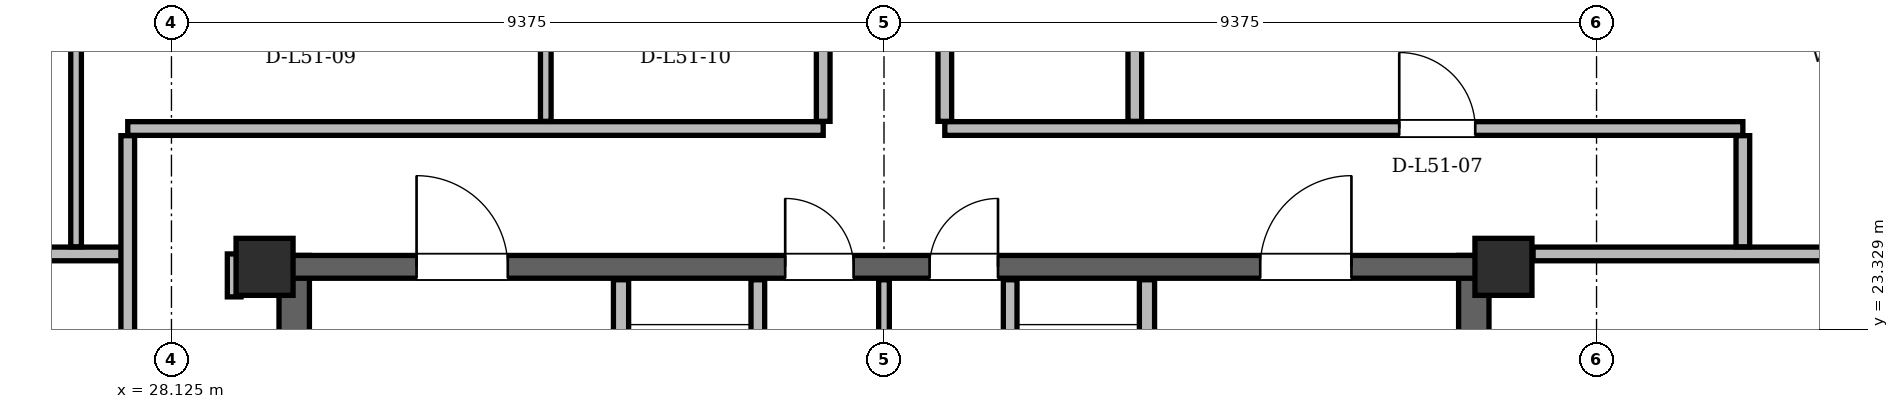
"""IFC4 building model, lengths in metres.
Left out: names, types, materials, properties, quantities, classifications, styles, units other than length and angle.
Written with IfcOpenShell. Run it as: python <this file> out.ifc"""

import sys

from ifc_helpers import new_model, si_unit, direction, frame, frame_2d, origin, origin_2d, place, context, subcontext, project, spatial, rectangle, hollow_rectangle, extrude, element, fill, save


model = new_model("IFC4")
c1 = context("Model", 3, precision=1e-05, world=origin(), true_north=direction((0.0, 1.0)))
c2 = subcontext(c1, "Body", "Model", "MODEL_VIEW")
j1 = project(units=[si_unit("LENGTHUNIT", "METRE"), si_unit("PLANEANGLEUNIT", "RADIAN")], contexts=[c1])
p1 = place(None, origin())
s1 = spatial("IfcSite", under=j1, at=p1, CompositionType="ELEMENT")
p2 = place(p1, origin())
s2 = spatial("IfcBuilding", under=s1, at=p2, CompositionType="ELEMENT")
p3 = place(p2, frame((0.0, 0.0, 193.8)))
s3 = spatial("IfcBuildingStorey", under=s2, at=p3, CompositionType="ELEMENT", Elevation=193.8)
for number, where, z_axis, x_axis in (
    (1, (45.65, 24.15, 0.0), (0.0, 0.0, 1.0), (1.0, 0.0, 0.0)),
    (2, (29.35, 24.15, 0.0), (0.0, 0.0, 1.0), (1.0, 0.0, 0.0)),
):
    element("IfcColumn", number, at=place(p3, frame(where, z_axis=z_axis, x_axis=x_axis)), inside=s3, PredefinedType="COLUMN", context=c2, shape_type="SweptSolid", body=[
        extrude(hollow_rectangle(XDim=0.75, YDim=0.75, WallThickness=0.06, at=origin_2d()), origin(), (0.0, 0.0, 1.0), 3.6),
    ])
for number, where, z_axis, x_axis in (
    (3, (29.74, 11.0, 0.0), (0.0, 0.0, 1.0), (0.0, 1.0, 0.0)),
    (4, (45.26, 11.0, 0.0), (0.0, 0.0, 1.0), (0.0, 1.0, 0.0)),
):
    element("IfcWall", number, at=place(p3, frame(where, z_axis=z_axis, x_axis=x_axis)), inside=s3, PredefinedType="SHEAR", context=c2, shape_type="SweptSolid", body=[
        extrude(rectangle(XDim=13.3, YDim=0.4, at=frame_2d((6.65, 0.0))), origin(), (0.0, 0.0, 1.0), 3.38),
    ])
p4 = place(p3, frame((29.65, 24.15, 0.0), z_axis=(0.0, 0.0, 1.0), x_axis=(1.0, 0.0, 0.0)))
e5 = element("IfcWall", 5, at=p4, inside=s3, PredefinedType="SHEAR", context=c2, shape_type="SweptSolid", body=[
    extrude(rectangle(XDim=15.7, YDim=0.3, at=frame_2d((7.85, 0.0))), origin(), (0.0, 0.0, 1.0), 3.38),
])
p5 = place(p4, frame((1.7, 0.0, 0.0)))
e6 = element("IfcOpeningElement", 6, at=p5, cuts=e5, PredefinedType="OPENING", context=c2, shape_type="SweptSolid", body=[
    extrude(rectangle(XDim=1.2, YDim=2.2, at=frame_2d((0.6, 1.1))), frame((0.0, 0.15, 0.0), z_axis=(0.0, -1.0, 0.0), x_axis=(1.0, 0.0, 0.0)), (0.0, 0.0, 1.0), 0.3),
])
p6 = place(p4, frame((12.8, 0.0, 0.0)))
e7 = element("IfcOpeningElement", 7, at=p6, cuts=e5, PredefinedType="OPENING", context=c2, shape_type="SweptSolid", body=[
    extrude(rectangle(XDim=1.2, YDim=2.2, at=frame_2d((0.6, 1.1))), frame((0.0, 0.15, 0.0), z_axis=(0.0, -1.0, 0.0), x_axis=(1.0, 0.0, 0.0)), (0.0, 0.0, 1.0), 0.3),
])
p7 = place(p4, frame((6.55, 0.0, 0.0)))
e8 = element("IfcOpeningElement", 8, at=p7, cuts=e5, PredefinedType="OPENING", context=c2, shape_type="SweptSolid", body=[
    extrude(rectangle(XDim=0.9, YDim=2.05, at=frame_2d((0.45, 1.025))), frame((0.0, 0.15, 0.0), z_axis=(0.0, -1.0, 0.0), x_axis=(1.0, 0.0, 0.0)), (0.0, 0.0, 1.0), 0.3),
])
p8 = place(p4, frame((8.45, 0.0, 0.0)))
e9 = element("IfcOpeningElement", 9, at=p8, cuts=e5, PredefinedType="OPENING", context=c2, shape_type="SweptSolid", body=[
    extrude(rectangle(XDim=0.9, YDim=2.05, at=frame_2d((0.45, 1.025))), frame((0.0, 0.15, 0.0), z_axis=(0.0, -1.0, 0.0), x_axis=(1.0, 0.0, 0.0)), (0.0, 0.0, 1.0), 0.3),
])
p9 = place(p3, frame((59.426, 11.839, 0.0), z_axis=(0.0, 0.0, 1.0), x_axis=(-0.499997159266, 0.866027043877, 0.0)))
e10 = element("IfcWall", 10, at=p9, inside=s3, PredefinedType="SOLIDWALL", context=c2, shape_type="SweptSolid", body=[
    extrude(rectangle(XDim=36.235, YDim=0.29, at=frame_2d((18.117, 0.0))), origin(), (0.0, 0.0, 1.0), 2.677),
])
p10 = place(p9, frame((6.579, 0.0, 0.0)))
e11 = element("IfcOpeningElement", 11, at=p10, cuts=e10, PredefinedType="OPENING", context=c2, shape_type="SweptSolid", body=[
    extrude(rectangle(XDim=1.5, YDim=2.2, at=frame_2d((0.75, 1.1))), frame((0.0, 0.145, 0.0), z_axis=(0.0, -1.0, 0.0), x_axis=(1.0, 0.0, 0.0)), (0.0, 0.0, 1.0), 0.29),
])
p11 = place(p9, frame((26.7, 0.0, 0.0)))
e12 = element("IfcOpeningElement", 12, at=p11, cuts=e10, PredefinedType="OPENING", context=c2, shape_type="SweptSolid", body=[
    extrude(rectangle(XDim=1.5, YDim=2.2, at=frame_2d((0.75, 1.1))), frame((0.0, 0.145, 0.0), z_axis=(0.0, -1.0, 0.0), x_axis=(1.0, 0.0, 0.0)), (0.0, 0.0, 1.0), 0.29),
])
p12 = place(p9, frame((34.18, 0.0, 0.85)))
e13 = element("IfcOpeningElement", 13, at=p12, cuts=e10, PredefinedType="OPENING", context=c2, shape_type="SweptSolid", body=[
    extrude(rectangle(XDim=1.2, YDim=1.48, at=frame_2d((0.6, 0.74))), frame((0.0, 0.145, 0.0), z_axis=(0.0, -1.0, 0.0), x_axis=(1.0, 0.0, 0.0)), (0.0, 0.0, 1.0), 0.29),
])
p13 = place(p9, frame((16.442, 0.0, 0.85)))
e14 = element("IfcOpeningElement", 14, at=p13, cuts=e10, PredefinedType="OPENING", context=c2, shape_type="SweptSolid", body=[
    extrude(rectangle(XDim=2.5, YDim=1.717, at=frame_2d((1.25, 0.858))), frame((0.0, 0.145, 0.0), z_axis=(0.0, -1.0, 0.0), x_axis=(1.0, 0.0, 0.0)), (0.0, 0.0, 1.0), 0.29),
])
p14 = place(p3, frame((33.691, 43.219, 0.0), z_axis=(0.0, 0.0, 1.0), x_axis=(-0.499997159266, -0.866027043877, 0.0)))
e15 = element("IfcWall", 15, at=p14, inside=s3, PredefinedType="SOLIDWALL", context=c2, shape_type="SweptSolid", body=[
    extrude(rectangle(XDim=36.235, YDim=0.29, at=frame_2d((18.117, 0.0))), origin(), (0.0, 0.0, 1.0), 2.677),
])
p15 = place(p14, frame((6.579, 0.0, 0.0)))
e16 = element("IfcOpeningElement", 16, at=p15, cuts=e15, PredefinedType="OPENING", context=c2, shape_type="SweptSolid", body=[
    extrude(rectangle(XDim=1.5, YDim=2.2, at=frame_2d((0.75, 1.1))), frame((0.0, 0.145, 0.0), z_axis=(0.0, -1.0, 0.0), x_axis=(1.0, 0.0, 0.0)), (0.0, 0.0, 1.0), 0.29),
])
p16 = place(p14, frame((26.7, 0.0, 0.0)))
e17 = element("IfcOpeningElement", 17, at=p16, cuts=e15, PredefinedType="OPENING", context=c2, shape_type="SweptSolid", body=[
    extrude(rectangle(XDim=1.5, YDim=2.2, at=frame_2d((0.75, 1.1))), frame((0.0, 0.145, 0.0), z_axis=(0.0, -1.0, 0.0), x_axis=(1.0, 0.0, 0.0)), (0.0, 0.0, 1.0), 0.29),
])
p17 = place(p14, frame((32.74, 0.0, 0.85)))
e18 = element("IfcOpeningElement", 18, at=p17, cuts=e15, PredefinedType="OPENING", context=c2, shape_type="SweptSolid", body=[
    extrude(rectangle(XDim=2.4, YDim=1.717, at=frame_2d((1.2, 0.858))), frame((0.0, 0.145, 0.0), z_axis=(0.0, -1.0, 0.0), x_axis=(1.0, 0.0, 0.0)), (0.0, 0.0, 1.0), 0.29),
])
p18 = place(p14, frame((21.971, 0.0, 0.85)))
e19 = element("IfcOpeningElement", 19, at=p18, cuts=e15, PredefinedType="OPENING", context=c2, shape_type="SweptSolid", body=[
    extrude(rectangle(XDim=2.0, YDim=1.717, at=frame_2d((1.0, 0.858))), frame((0.0, 0.145, 0.0), z_axis=(0.0, -1.0, 0.0), x_axis=(1.0, 0.0, 0.0)), (0.0, 0.0, 1.0), 0.29),
])
p19 = place(p14, frame((2.383, 0.0, 0.85)))
e20 = element("IfcOpeningElement", 20, at=p19, cuts=e15, PredefinedType="OPENING", context=c2, shape_type="SweptSolid", body=[
    extrude(rectangle(XDim=1.6, YDim=1.7, at=frame_2d((0.8, 0.85))), frame((0.0, 0.145, 0.0), z_axis=(0.0, -1.0, 0.0), x_axis=(1.0, 0.0, 0.0)), (0.0, 0.0, 1.0), 0.29),
])
p20 = place(p14, frame((13.348, 0.0, 0.85)))
e21 = element("IfcOpeningElement", 21, at=p20, cuts=e15, PredefinedType="OPENING", context=c2, shape_type="SweptSolid", body=[
    extrude(rectangle(XDim=3.0, YDim=1.717, at=frame_2d((1.5, 0.858))), frame((0.0, 0.145, 0.0), z_axis=(0.0, -1.0, 0.0), x_axis=(1.0, 0.0, 0.0)), (0.0, 0.0, 1.0), 0.29),
])
p21 = place(p3, frame((34.04, 19.48, 0.0), z_axis=(0.0, 0.0, 1.0), x_axis=(0.0, 1.0, 0.0)))
e22 = element("IfcWall", 22, at=p21, inside=s3, PredefinedType="PARTITIONING", context=c2, shape_type="SweptSolid", body=[
    extrude(rectangle(XDim=4.5, YDim=0.2, at=frame_2d((2.25, 0.0))), origin(), (0.0, 0.0, 1.0), 3.38),
])
p22 = place(p21, frame((2.12, 0.0, 0.0)))
e23 = element("IfcOpeningElement", 23, at=p22, cuts=e22, PredefinedType="OPENING", context=c2, shape_type="SweptSolid", body=[
    extrude(rectangle(XDim=1.1, YDim=2.2, at=frame_2d((0.55, 1.1))), frame((0.0, 0.1, 0.0), z_axis=(0.0, -1.0, 0.0), x_axis=(1.0, 0.0, 0.0)), (0.0, 0.0, 1.0), 0.2),
])
p23 = place(p3, frame((35.84, 20.96, 0.0), z_axis=(0.0, 0.0, 1.0), x_axis=(0.0, 1.0, 0.0)))
e24 = element("IfcWall", 24, at=p23, inside=s3, PredefinedType="PARTITIONING", context=c2, shape_type="SweptSolid", body=[
    extrude(rectangle(XDim=3.02, YDim=0.18, at=frame_2d((1.51, 0.0))), origin(), (0.0, 0.0, 1.0), 3.38),
])
p24 = place(p3, frame((40.96, 19.48, 0.0), z_axis=(0.0, 0.0, 1.0), x_axis=(0.0, 1.0, 0.0)))
e25 = element("IfcWall", 25, at=p24, inside=s3, PredefinedType="PARTITIONING", context=c2, shape_type="SweptSolid", body=[
    extrude(rectangle(XDim=4.5, YDim=0.2, at=frame_2d((2.25, 0.0))), origin(), (0.0, 0.0, 1.0), 3.38),
])
p25 = place(p24, frame((2.12, 0.0, 0.0)))
e26 = element("IfcOpeningElement", 26, at=p25, cuts=e25, PredefinedType="OPENING", context=c2, shape_type="SweptSolid", body=[
    extrude(rectangle(XDim=1.1, YDim=2.2, at=frame_2d((0.55, 1.1))), frame((0.0, 0.1, 0.0), z_axis=(0.0, -1.0, 0.0), x_axis=(1.0, 0.0, 0.0)), (0.0, 0.0, 1.0), 0.2),
])
p26 = place(p3, frame((39.16, 20.96, 0.0), z_axis=(0.0, 0.0, 1.0), x_axis=(0.0, 1.0, 0.0)))
e27 = element("IfcWall", 27, at=p26, inside=s3, PredefinedType="PARTITIONING", context=c2, shape_type="SweptSolid", body=[
    extrude(rectangle(XDim=3.02, YDim=0.18, at=frame_2d((1.51, 0.0))), origin(), (0.0, 0.0, 1.0), 3.38),
])
p27 = place(p3, frame((37.5, 21.06, 0.0), z_axis=(0.0, 0.0, 1.0), x_axis=(0.0, 1.0, 0.0)))
e28 = element("IfcWall", 28, at=p27, inside=s3, PredefinedType="PARTITIONING", context=c2, shape_type="SweptSolid", body=[
    extrude(rectangle(XDim=2.92, YDim=0.14, at=frame_2d((1.46, 0.0))), origin(), (0.0, 0.0, 1.0), 3.38),
])
p28 = place(p3, frame((22.952, 24.32, 0.0), z_axis=(0.0, 0.0, 1.0), x_axis=(1.0, 0.0, 0.0)))
e29 = element("IfcWall", 29, at=p28, inside=s3, PredefinedType="PARTITIONING", context=c2, shape_type="SweptSolid", body=[
    extrude(rectangle(XDim=4.658, YDim=0.18, at=frame_2d((2.329, 0.0))), origin(), (0.0, 0.0, 1.0), 3.38),
])
p29 = place(p3, frame((46.04, 24.32, 0.0), z_axis=(0.0, 0.0, 1.0), x_axis=(1.0, 0.0, 0.0)))
e30 = element("IfcWall", 30, at=p29, inside=s3, PredefinedType="PARTITIONING", context=c2, shape_type="SweptSolid", body=[
    extrude(rectangle(XDim=6.008, YDim=0.18, at=frame_2d((3.004, 0.0))), origin(), (0.0, 0.0, 1.0), 3.38),
])
p30 = place(p3, frame((27.55, 25.97, 0.0), z_axis=(0.0, 0.0, 1.0), x_axis=(1.0, 0.0, 0.0)))
e31 = element("IfcWall", 31, at=p30, inside=s3, PredefinedType="PARTITIONING", context=c2, shape_type="SweptSolid", body=[
    extrude(rectangle(XDim=9.15, YDim=0.18, at=frame_2d((4.575, 0.0))), origin(), (0.0, 0.0, 1.0), 2.913),
])
p31 = place(p3, frame((38.3, 25.97, 0.0), z_axis=(0.0, 0.0, 1.0), x_axis=(1.0, 0.0, 0.0)))
e32 = element("IfcWall", 32, at=p31, inside=s3, PredefinedType="PARTITIONING", context=c2, shape_type="SweptSolid", body=[
    extrude(rectangle(XDim=10.5, YDim=0.18, at=frame_2d((5.25, 0.0))), origin(), (0.0, 0.0, 1.0), 2.913),
])
p32 = place(p31, frame((5.979, 0.0, 0.0)))
e33 = element("IfcOpeningElement", 33, at=p32, cuts=e32, PredefinedType="OPENING", context=c2, shape_type="SweptSolid", body=[
    extrude(rectangle(XDim=1.0, YDim=2.18, at=frame_2d((0.5, 1.09))), frame((0.0, 0.09, 0.0), z_axis=(0.0, -1.0, 0.0), x_axis=(1.0, 0.0, 0.0)), (0.0, 0.0, 1.0), 0.18),
])
p33 = place(p3, frame((26.87, 24.414, 0.0), z_axis=(0.0, 0.0, 1.0), x_axis=(0.0, 1.0, 0.0)))
e34 = element("IfcWall", 34, at=p33, inside=s3, PredefinedType="PARTITIONING", context=c2, shape_type="SweptSolid", body=[
    extrude(rectangle(XDim=2.912, YDim=0.14, at=frame_2d((1.456, 0.0))), origin(), (0.0, 0.0, 1.0), 3.38),
])
p34 = place(p3, frame((27.55, 18.544, 0.0), z_axis=(0.0, 0.0, 1.0), x_axis=(0.0, 1.0, 0.0)))
e35 = element("IfcWall", 35, at=p34, inside=s3, PredefinedType="PARTITIONING", context=c2, shape_type="SweptSolid", body=[
    extrude(rectangle(XDim=7.332, YDim=0.18, at=frame_2d((3.666, 0.0))), origin(), (0.0, 0.0, 1.0), 3.38),
])
p35 = place(p3, frame((28.95, 23.755, 0.0), z_axis=(0.0, 0.0, 1.0), x_axis=(0.0, 1.0, 0.0)))
e36 = element("IfcWall", 36, at=p35, inside=s3, PredefinedType="PARTITIONING", context=c2, shape_type="SweptSolid", body=[
    extrude(rectangle(XDim=0.565, YDim=0.18, at=frame_2d((0.283, 0.0))), origin(), (0.0, 0.0, 1.0), 3.38),
])
p36 = place(p3, frame((33.05, 26.064, 0.0), z_axis=(0.0, 0.0, 1.0), x_axis=(0.0, 1.0, 0.0)))
e37 = element("IfcWall", 37, at=p36, inside=s3, PredefinedType="PARTITIONING", context=c2, shape_type="SweptSolid", body=[
    extrude(rectangle(XDim=1.262, YDim=0.14, at=frame_2d((0.631, 0.0))), origin(), (0.0, 0.0, 1.0), 3.38),
])
p37 = place(p3, frame((36.7, 26.064, 0.0), z_axis=(0.0, 0.0, 1.0), x_axis=(0.0, 1.0, 0.0)))
e38 = element("IfcWall", 38, at=p37, inside=s3, PredefinedType="PARTITIONING", context=c2, shape_type="SweptSolid", body=[
    extrude(rectangle(XDim=17.006, YDim=0.18, at=frame_2d((8.503, 0.0))), origin(), (0.0, 0.0, 1.0), 3.38),
])
p38 = place(p37, frame((3.21, 0.0, 0.0)))
e39 = element("IfcOpeningElement", 39, at=p38, cuts=e38, PredefinedType="OPENING", context=c2, shape_type="SweptSolid", body=[
    extrude(rectangle(XDim=1.0, YDim=2.18, at=frame_2d((0.5, 1.09))), frame((0.0, 0.09, 0.0), z_axis=(0.0, -1.0, 0.0), x_axis=(1.0, 0.0, 0.0)), (0.0, 0.0, 1.0), 0.18),
])
p39 = place(p3, frame((38.3, 26.064, 0.0), z_axis=(0.0, 0.0, 1.0), x_axis=(0.0, 1.0, 0.0)))
e40 = element("IfcWall", 40, at=p39, inside=s3, PredefinedType="PARTITIONING", context=c2, shape_type="SweptSolid", body=[
    extrude(rectangle(XDim=6.042, YDim=0.18, at=frame_2d((3.021, 0.0))), origin(), (0.0, 0.0, 1.0), 3.38),
])
p40 = place(p39, frame((4.892, 0.0, 0.0)))
e41 = element("IfcOpeningElement", 41, at=p40, cuts=e40, PredefinedType="OPENING", context=c2, shape_type="SweptSolid", body=[
    extrude(rectangle(XDim=1.0, YDim=2.18, at=frame_2d((0.5, 1.09))), frame((0.0, 0.09, 0.0), z_axis=(0.0, -1.0, 0.0), x_axis=(1.0, 0.0, 0.0)), (0.0, 0.0, 1.0), 0.18),
])
p41 = place(p3, frame((40.8, 26.064, 0.0), z_axis=(0.0, 0.0, 1.0), x_axis=(0.0, 1.0, 0.0)))
e42 = element("IfcWall", 42, at=p41, inside=s3, PredefinedType="PARTITIONING", context=c2, shape_type="SweptSolid", body=[
    extrude(rectangle(XDim=17.006, YDim=0.18, at=frame_2d((8.503, 0.0))), origin(), (0.0, 0.0, 1.0), 3.38),
])
p42 = place(p3, frame((48.8, 24.414, 0.0), z_axis=(0.0, 0.0, 1.0), x_axis=(0.0, 1.0, 0.0)))
e43 = element("IfcWall", 43, at=p42, inside=s3, PredefinedType="PARTITIONING", context=c2, shape_type="SweptSolid", body=[
    extrude(rectangle(XDim=1.462, YDim=0.18, at=frame_2d((0.731, 0.0))), origin(), (0.0, 0.0, 1.0), 3.38),
])
p43 = place(p5, origin())
e44 = element("IfcDoor", 44, at=p43, inside=s3, OperationType="SINGLE_SWING_LEFT", PredefinedType="DOOR", context=c2, shape_type="SweptSolid", body=[
    extrude(rectangle(XDim=1.2, YDim=2.2, at=frame_2d((0.6, 1.1))), frame((0.0, 0.025, 0.0), z_axis=(0.0, -1.0, 0.0), x_axis=(1.0, 0.0, 0.0)), (0.0, 0.0, 1.0), 0.05),
])
fill(e6, e44)
p44 = place(p6, origin())
e45 = element("IfcDoor", 45, at=p44, inside=s3, OperationType="SINGLE_SWING_RIGHT", PredefinedType="DOOR", context=c2, shape_type="SweptSolid", body=[
    extrude(rectangle(XDim=1.2, YDim=2.2, at=frame_2d((0.6, 1.1))), frame((0.0, 0.025, 0.0), z_axis=(0.0, -1.0, 0.0), x_axis=(1.0, 0.0, 0.0)), (0.0, 0.0, 1.0), 0.05),
])
fill(e7, e45)
p45 = place(p7, origin())
e46 = element("IfcDoor", 46, at=p45, inside=s3, OperationType="SINGLE_SWING_LEFT", PredefinedType="DOOR", context=c2, shape_type="SweptSolid", body=[
    extrude(rectangle(XDim=0.9, YDim=2.05, at=frame_2d((0.45, 1.025))), frame((0.0, 0.025, 0.0), z_axis=(0.0, -1.0, 0.0), x_axis=(1.0, 0.0, 0.0)), (0.0, 0.0, 1.0), 0.05),
])
fill(e8, e46)
p46 = place(p8, origin())
e47 = element("IfcDoor", 47, at=p46, inside=s3, OperationType="SINGLE_SWING_RIGHT", PredefinedType="DOOR", context=c2, shape_type="SweptSolid", body=[
    extrude(rectangle(XDim=0.9, YDim=2.05, at=frame_2d((0.45, 1.025))), frame((0.0, 0.025, 0.0), z_axis=(0.0, -1.0, 0.0), x_axis=(1.0, 0.0, 0.0)), (0.0, 0.0, 1.0), 0.05),
])
fill(e9, e47)
p47 = place(p32, origin())
e48 = element("IfcDoor", 48, at=p47, inside=s3, OperationType="SINGLE_SWING_LEFT", PredefinedType="DOOR", context=c2, shape_type="SweptSolid", body=[
    extrude(rectangle(XDim=1.0, YDim=2.18, at=frame_2d((0.5, 1.09))), frame((0.0, 0.025, 0.0), z_axis=(0.0, -1.0, 0.0), x_axis=(1.0, 0.0, 0.0)), (0.0, 0.0, 1.0), 0.05),
])
fill(e33, e48)
save(model, sys.argv[1])
